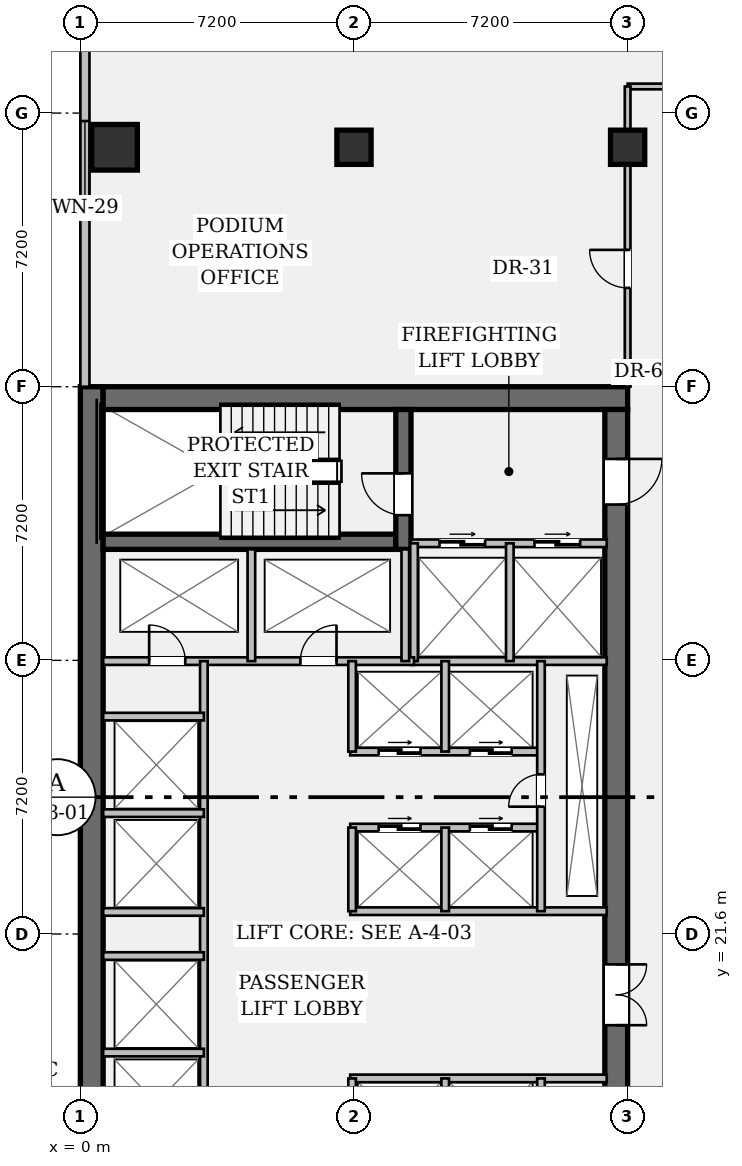
"""IFC4 building model, lengths in metres.
Left out: names, types, materials, properties, quantities, classifications, styles, units other than length and angle.
Written with IfcOpenShell. Run it as: python <this file> out.ifc"""

import sys

from ifc_helpers import new_model, si_unit, direction, frame, frame_2d, origin, origin_2d, place, context, subcontext, project, spatial, rectangle, hollow_rectangle, extrude, element, fill, save


model = new_model("IFC4")
c1 = context("Model", 3, precision=1e-05, world=origin(), true_north=direction((0.0, 1.0)))
c2 = subcontext(c1, "Body", "Model", "MODEL_VIEW")
j1 = project(units=[si_unit("LENGTHUNIT", "METRE"), si_unit("PLANEANGLEUNIT", "RADIAN")], contexts=[c1])
p1 = place(None, origin())
s1 = spatial("IfcSite", under=j1, at=p1, CompositionType="ELEMENT")
p2 = place(p1, origin())
s2 = spatial("IfcBuilding", under=s1, at=p2, CompositionType="ELEMENT")
p3 = place(p2, frame((0.0, 0.0, 5.25)))
s3 = spatial("IfcBuildingStorey", under=s2, at=p3, CompositionType="ELEMENT", Elevation=5.25)
p4 = place(p3, frame((0.3, 7.2, 0.0), z_axis=(0.0, 0.0, 1.0), x_axis=(0.0, 1.0, 0.0)))
e1 = element("IfcWall", 1, at=p4, inside=s3, PredefinedType="SHEAR", context=c2, shape_type="SweptSolid", body=[
    extrude(rectangle(XDim=28.8, YDim=0.6, at=frame_2d((14.4, 0.0))), origin(), (0.0, 0.0, 1.0), 3.9),
])
p5 = place(p3, frame((0.6, 35.7, 0.0), z_axis=(0.0, 0.0, 1.0), x_axis=(1.0, 0.0, 0.0)))
e2 = element("IfcWall", 2, at=p5, inside=s3, PredefinedType="SHEAR", context=c2, shape_type="SweptSolid", body=[
    extrude(rectangle(XDim=13.8, YDim=0.6, at=frame_2d((6.9, 0.0))), origin(), (0.0, 0.0, 1.0), 3.9),
])
p6 = place(p3, frame((14.1, 35.4, 0.0), z_axis=(0.0, 0.0, 1.0), x_axis=(0.0, -1.0, 0.0)))
e3 = element("IfcWall", 3, at=p6, inside=s3, PredefinedType="SHEAR", context=c2, shape_type="SweptSolid", body=[
    extrude(rectangle(XDim=27.6, YDim=0.6, at=frame_2d((13.8, 0.0))), origin(), (0.0, 0.0, 1.0), 3.9),
])
p7 = place(p6, frame((1.3, 0.0, 0.0)))
e4 = element("IfcOpeningElement", 4, at=p7, cuts=e3, PredefinedType="OPENING", context=c2, shape_type="SweptSolid", body=[
    extrude(rectangle(XDim=1.2, YDim=2.15, at=frame_2d((0.6, 1.075))), frame((0.0, 0.312, 0.0), z_axis=(0.0, -1.0, 0.0), x_axis=(1.0, 0.0, 0.0)), (0.0, 0.0, 1.0), 0.624),
])
p8 = place(p6, frame((25.25, 0.0, 0.0)))
e5 = element("IfcOpeningElement", 5, at=p8, cuts=e3, PredefinedType="OPENING", context=c2, shape_type="SweptSolid", body=[
    extrude(rectangle(XDim=1.2, YDim=2.15, at=frame_2d((0.6, 1.075))), frame((0.0, 0.312, 0.0), z_axis=(0.0, -1.0, 0.0), x_axis=(1.0, 0.0, 0.0)), (0.0, 0.0, 1.0), 0.624),
])
p9 = place(p6, frame((14.6, 0.0, 0.0)))
e6 = element("IfcOpeningElement", 6, at=p9, cuts=e3, PredefinedType="OPENING", context=c2, shape_type="SweptSolid", body=[
    extrude(rectangle(XDim=1.6, YDim=2.2, at=frame_2d((0.8, 1.1))), frame((0.0, 0.312, 0.0), z_axis=(0.0, -1.0, 0.0), x_axis=(1.0, 0.0, 0.0)), (0.0, 0.0, 1.0), 0.624),
])
p10 = place(p3, frame((0.6, 31.92, 0.0), z_axis=(0.0, 0.0, 1.0), x_axis=(1.0, 0.0, 0.0)))
e7 = element("IfcWall", 7, at=p10, inside=s3, PredefinedType="SHEAR", context=c2, shape_type="SweptSolid", body=[
    extrude(rectangle(XDim=7.7, YDim=0.4, at=frame_2d((3.85, 0.0))), origin(), (0.0, 0.0, 1.0), 3.9),
])
p11 = place(p3, frame((8.5, 31.72, 0.0), z_axis=(0.0, 0.0, 1.0), x_axis=(0.0, 1.0, 0.0)))
e8 = element("IfcWall", 8, at=p11, inside=s3, PredefinedType="SHEAR", context=c2, shape_type="SweptSolid", body=[
    extrude(rectangle(XDim=3.68, YDim=0.4, at=frame_2d((1.84, 0.0))), origin(), (0.0, 0.0, 1.0), 3.9),
])
p12 = place(p11, frame((0.9, 0.0, 0.0)))
e9 = element("IfcOpeningElement", 9, at=p12, cuts=e8, PredefinedType="OPENING", context=c2, shape_type="SweptSolid", body=[
    extrude(rectangle(XDim=1.1, YDim=2.15, at=frame_2d((0.55, 1.075))), frame((0.0, 0.212, 0.0), z_axis=(0.0, -1.0, 0.0), x_axis=(1.0, 0.0, 0.0)), (0.0, 0.0, 1.0), 0.424),
])
p13 = place(p3, frame((0.9, 42.3, 0.0), z_axis=(0.0, 0.0, 1.0), x_axis=(1.0, 0.0, 0.0)))
e10 = element("IfcColumn", 10, at=p13, inside=s3, PredefinedType="COLUMN", context=c2, shape_type="SweptSolid", body=[
    extrude(hollow_rectangle(XDim=1.2, YDim=1.2, WallThickness=0.075, at=origin_2d()), origin(), (0.0, 0.0, 1.0), 3.9),
])
for number, where, z_axis, x_axis in (
    (11, (7.2, 42.3, 0.0), (0.0, 0.0, 1.0), (1.0, 0.0, 0.0)),
    (12, (14.4, 42.3, 0.0), (0.0, 0.0, 1.0), (1.0, 0.0, 0.0)),
):
    element("IfcColumn", number, at=place(p3, frame(where, z_axis=z_axis, x_axis=x_axis)), inside=s3, PredefinedType="COLUMN", context=c2, shape_type="SweptSolid", body=[
        extrude(rectangle(XDim=0.9, YDim=0.9, at=origin_2d()), origin(), (0.0, 0.0, 1.0), 3.9),
    ])
p14 = place(p3, frame((0.12, 36.0, 0.0), z_axis=(0.0, 0.0, 1.0), x_axis=(0.0, 1.0, 0.0)))
e13 = element("IfcWall", 13, at=p14, inside=s3, PredefinedType="STANDARD", context=c2, shape_type="SweptSolid", body=[
    extrude(rectangle(XDim=11.58, YDim=0.24, at=frame_2d((5.79, 0.0))), origin(), (0.0, 0.0, 1.0), 3.9),
])
p15 = place(p14, frame((4.59, 0.0, 0.95)))
e14 = element("IfcOpeningElement", 14, at=p15, cuts=e13, PredefinedType="OPENING", context=c2, shape_type="SweptSolid", body=[
    extrude(rectangle(XDim=2.4, YDim=1.8, at=frame_2d((1.2, 0.9))), frame((0.0, 0.132, 0.0), z_axis=(0.0, -1.0, 0.0), x_axis=(1.0, 0.0, 0.0)), (0.0, 0.0, 1.0), 0.264),
])
p16 = place(p3, frame((8.7, 31.88, 0.0), z_axis=(0.0, 0.0, 1.0), x_axis=(1.0, 0.0, 0.0)))
e15 = element("IfcWall", 15, at=p16, inside=s3, PredefinedType="PARTITIONING", context=c2, shape_type="SweptSolid", body=[
    extrude(rectangle(XDim=5.15, YDim=0.2, at=frame_2d((2.575, 0.0))), origin(), (0.0, 0.0, 1.0), 3.9),
])
p17 = place(p16, frame((0.75, 0.0, 0.0)))
e16 = element("IfcOpeningElement", 16, at=p17, cuts=e15, PredefinedType="OPENING", context=c2, shape_type="SweptSolid", body=[
    extrude(rectangle(XDim=1.2, YDim=2.2, at=frame_2d((0.6, 1.1))), frame((0.0, 0.112, 0.0), z_axis=(0.0, -1.0, 0.0), x_axis=(1.0, 0.0, 0.0)), (0.0, 0.0, 1.0), 0.224),
])
p18 = place(p16, frame((3.25, 0.0, 0.0)))
e17 = element("IfcOpeningElement", 17, at=p18, cuts=e15, PredefinedType="OPENING", context=c2, shape_type="SweptSolid", body=[
    extrude(rectangle(XDim=1.2, YDim=2.2, at=frame_2d((0.6, 1.1))), frame((0.0, 0.112, 0.0), z_axis=(0.0, -1.0, 0.0), x_axis=(1.0, 0.0, 0.0)), (0.0, 0.0, 1.0), 0.224),
])
p19 = place(p3, frame((8.7, 28.78, 0.0), z_axis=(0.0, 0.0, 1.0), x_axis=(1.0, 0.0, 0.0)))
e18 = element("IfcWall", 18, at=p19, inside=s3, PredefinedType="PARTITIONING", context=c2, shape_type="SweptSolid", body=[
    extrude(rectangle(XDim=5.15, YDim=0.2, at=frame_2d((2.575, 0.0))), origin(), (0.0, 0.0, 1.0), 3.9),
])
for number, where, z_axis, x_axis in (
    (19, (8.78, 28.78, 0.0), (0.0, 0.0, 1.0), (0.0, 1.0, 0.0)),
    (20, (11.3, 28.78, 0.0), (0.0, 0.0, 1.0), (0.0, 1.0, 0.0)),
):
    element("IfcWall", number, at=place(p3, frame(where, z_axis=z_axis, x_axis=x_axis)), inside=s3, PredefinedType="PARTITIONING", context=c2, shape_type="SweptSolid", body=[
        extrude(rectangle(XDim=3.1, YDim=0.2, at=frame_2d((1.55, 0.0))), origin(), (0.0, 0.0, 1.0), 3.9),
    ])
p20 = place(p3, frame((0.6, 28.78, 0.0), z_axis=(0.0, 0.0, 1.0), x_axis=(1.0, 0.0, 0.0)))
e21 = element("IfcWall", 21, at=p20, inside=s3, PredefinedType="PARTITIONING", context=c2, shape_type="SweptSolid", body=[
    extrude(rectangle(XDim=8.18, YDim=0.2, at=frame_2d((4.09, 0.0))), origin(), (0.0, 0.0, 1.0), 3.9),
])
p21 = place(p20, frame((1.21, 0.0, 0.0)))
e22 = element("IfcOpeningElement", 22, at=p21, cuts=e21, PredefinedType="OPENING", context=c2, shape_type="SweptSolid", body=[
    extrude(rectangle(XDim=0.95, YDim=2.15, at=frame_2d((0.475, 1.075))), frame((0.0, 0.112, 0.0), z_axis=(0.0, -1.0, 0.0), x_axis=(1.0, 0.0, 0.0)), (0.0, 0.0, 1.0), 0.224),
])
p22 = place(p20, frame((5.19, 0.0, 0.0)))
e23 = element("IfcOpeningElement", 23, at=p22, cuts=e21, PredefinedType="OPENING", context=c2, shape_type="SweptSolid", body=[
    extrude(rectangle(XDim=0.95, YDim=2.15, at=frame_2d((0.475, 1.075))), frame((0.0, 0.112, 0.0), z_axis=(0.0, -1.0, 0.0), x_axis=(1.0, 0.0, 0.0)), (0.0, 0.0, 1.0), 0.224),
])
for number, where, z_axis, x_axis in (
    (24, (4.5, 28.78, 0.0), (0.0, 0.0, 1.0), (0.0, 1.0, 0.0)),
    (25, (8.55, 28.78, 0.0), (0.0, 0.0, 1.0), (0.0, 1.0, 0.0)),
):
    element("IfcWall", number, at=place(p3, frame(where, z_axis=z_axis, x_axis=x_axis)), inside=s3, PredefinedType="PARTITIONING", context=c2, shape_type="SweptSolid", body=[
        extrude(rectangle(XDim=2.94, YDim=0.2, at=frame_2d((1.47, 0.0))), origin(), (0.0, 0.0, 1.0), 3.9),
    ])
p23 = place(p3, frame((3.25, 15.7, 0.0), z_axis=(0.0, 0.0, 1.0), x_axis=(0.0, 1.0, 0.0)))
e26 = element("IfcWall", 26, at=p23, inside=s3, PredefinedType="PARTITIONING", context=c2, shape_type="SweptSolid", body=[
    extrude(rectangle(XDim=13.08, YDim=0.2, at=frame_2d((6.54, 0.0))), origin(), (0.0, 0.0, 1.0), 3.9),
])
for number, where, z_axis, x_axis in (
    (27, (0.6, 18.48, 0.0), (0.0, 0.0, 1.0), (1.0, 0.0, 0.0)),
    (28, (0.6, 22.18, 0.0), (0.0, 0.0, 1.0), (1.0, 0.0, 0.0)),
    (29, (0.6, 24.78, 0.0), (0.0, 0.0, 1.0), (1.0, 0.0, 0.0)),
    (30, (0.6, 21.02, 0.0), (0.0, 0.0, 1.0), (1.0, 0.0, 0.0)),
    (31, (0.6, 27.32, 0.0), (0.0, 0.0, 1.0), (1.0, 0.0, 0.0)),
):
    element("IfcWall", number, at=place(p3, frame(where, z_axis=z_axis, x_axis=x_axis)), inside=s3, PredefinedType="PARTITIONING", context=c2, shape_type="SweptSolid", body=[
        extrude(rectangle(XDim=2.65, YDim=0.2, at=frame_2d((1.325, 0.0))), origin(), (0.0, 0.0, 1.0), 3.9),
    ])
p24 = place(p3, frame((7.1, 22.2, 0.0), z_axis=(0.0, 0.0, 1.0), x_axis=(1.0, 0.0, 0.0)))
e32 = element("IfcWall", 32, at=p24, inside=s3, PredefinedType="PARTITIONING", context=c2, shape_type="SweptSolid", body=[
    extrude(rectangle(XDim=6.75, YDim=0.2, at=frame_2d((3.375, 0.0))), origin(), (0.0, 0.0, 1.0), 3.9),
])
p25 = place(p3, frame((7.1, 24.4, 0.0), z_axis=(0.0, 0.0, 1.0), x_axis=(1.0, 0.0, 0.0)))
e33 = element("IfcWall", 33, at=p25, inside=s3, PredefinedType="PARTITIONING", context=c2, shape_type="SweptSolid", body=[
    extrude(rectangle(XDim=5.02, YDim=0.2, at=frame_2d((2.51, 0.0))), origin(), (0.0, 0.0, 1.0), 3.9),
])
p26 = place(p25, frame((0.75, 0.0, 0.0)))
e34 = element("IfcOpeningElement", 34, at=p26, cuts=e33, PredefinedType="OPENING", context=c2, shape_type="SweptSolid", body=[
    extrude(rectangle(XDim=1.1, YDim=2.2, at=frame_2d((0.55, 1.1))), frame((0.0, 0.112, 0.0), z_axis=(0.0, -1.0, 0.0), x_axis=(1.0, 0.0, 0.0)), (0.0, 0.0, 1.0), 0.224),
])
p27 = place(p25, frame((3.15, 0.0, 0.0)))
e35 = element("IfcOpeningElement", 35, at=p27, cuts=e33, PredefinedType="OPENING", context=c2, shape_type="SweptSolid", body=[
    extrude(rectangle(XDim=1.1, YDim=2.2, at=frame_2d((0.55, 1.1))), frame((0.0, 0.112, 0.0), z_axis=(0.0, -1.0, 0.0), x_axis=(1.0, 0.0, 0.0)), (0.0, 0.0, 1.0), 0.224),
])
p28 = place(p3, frame((7.1, 26.4, 0.0), z_axis=(0.0, 0.0, 1.0), x_axis=(1.0, 0.0, 0.0)))
e36 = element("IfcWall", 36, at=p28, inside=s3, PredefinedType="PARTITIONING", context=c2, shape_type="SweptSolid", body=[
    extrude(rectangle(XDim=5.02, YDim=0.2, at=frame_2d((2.51, 0.0))), origin(), (0.0, 0.0, 1.0), 3.9),
])
p29 = place(p28, frame((0.75, 0.0, 0.0)))
e37 = element("IfcOpeningElement", 37, at=p29, cuts=e36, PredefinedType="OPENING", context=c2, shape_type="SweptSolid", body=[
    extrude(rectangle(XDim=1.1, YDim=2.2, at=frame_2d((0.55, 1.1))), frame((0.0, 0.112, 0.0), z_axis=(0.0, -1.0, 0.0), x_axis=(1.0, 0.0, 0.0)), (0.0, 0.0, 1.0), 0.224),
])
p30 = place(p28, frame((3.15, 0.0, 0.0)))
e38 = element("IfcOpeningElement", 38, at=p30, cuts=e36, PredefinedType="OPENING", context=c2, shape_type="SweptSolid", body=[
    extrude(rectangle(XDim=1.1, YDim=2.2, at=frame_2d((0.55, 1.1))), frame((0.0, 0.112, 0.0), z_axis=(0.0, -1.0, 0.0), x_axis=(1.0, 0.0, 0.0)), (0.0, 0.0, 1.0), 0.224),
])
p31 = place(p3, frame((7.15, 22.2, 0.0), z_axis=(0.0, 0.0, 1.0), x_axis=(0.0, 1.0, 0.0)))
e39 = element("IfcWall", 39, at=p31, inside=s3, PredefinedType="PARTITIONING", context=c2, shape_type="SweptSolid", body=[
    extrude(rectangle(XDim=2.2, YDim=0.2, at=frame_2d((1.1, 0.0))), origin(), (0.0, 0.0, 1.0), 3.9),
])
p32 = place(p3, frame((7.15, 26.4, 0.0), z_axis=(0.0, 0.0, 1.0), x_axis=(0.0, 1.0, 0.0)))
e40 = element("IfcWall", 40, at=p32, inside=s3, PredefinedType="PARTITIONING", context=c2, shape_type="SweptSolid", body=[
    extrude(rectangle(XDim=2.38, YDim=0.2, at=frame_2d((1.19, 0.0))), origin(), (0.0, 0.0, 1.0), 3.9),
])
p33 = place(p3, frame((9.6, 22.2, 0.0), z_axis=(0.0, 0.0, 1.0), x_axis=(0.0, 1.0, 0.0)))
e41 = element("IfcWall", 41, at=p33, inside=s3, PredefinedType="PARTITIONING", context=c2, shape_type="SweptSolid", body=[
    extrude(rectangle(XDim=2.2, YDim=0.2, at=frame_2d((1.1, 0.0))), origin(), (0.0, 0.0, 1.0), 3.9),
])
p34 = place(p3, frame((9.6, 26.4, 0.0), z_axis=(0.0, 0.0, 1.0), x_axis=(0.0, 1.0, 0.0)))
e42 = element("IfcWall", 42, at=p34, inside=s3, PredefinedType="PARTITIONING", context=c2, shape_type="SweptSolid", body=[
    extrude(rectangle(XDim=2.38, YDim=0.2, at=frame_2d((1.19, 0.0))), origin(), (0.0, 0.0, 1.0), 3.9),
])
p35 = place(p3, frame((12.12, 22.2, 0.0), z_axis=(0.0, 0.0, 1.0), x_axis=(0.0, 1.0, 0.0)))
e43 = element("IfcWall", 43, at=p35, inside=s3, PredefinedType="PARTITIONING", context=c2, shape_type="SweptSolid", body=[
    extrude(rectangle(XDim=6.58, YDim=0.2, at=frame_2d((3.29, 0.0))), origin(), (0.0, 0.0, 1.0), 3.9),
])
p36 = place(p35, frame((2.75, 0.0, 0.0)))
e44 = element("IfcOpeningElement", 44, at=p36, cuts=e43, PredefinedType="OPENING", context=c2, shape_type="SweptSolid", body=[
    extrude(rectangle(XDim=0.85, YDim=2.15, at=frame_2d((0.425, 1.075))), frame((0.0, 0.112, 0.0), z_axis=(0.0, -1.0, 0.0), x_axis=(1.0, 0.0, 0.0)), (0.0, 0.0, 1.0), 0.224),
])
p37 = place(p3, frame((7.1, 17.8, 0.0), z_axis=(0.0, 0.0, 1.0), x_axis=(1.0, 0.0, 0.0)))
e45 = element("IfcWall", 45, at=p37, inside=s3, PredefinedType="PARTITIONING", context=c2, shape_type="SweptSolid", body=[
    extrude(rectangle(XDim=6.75, YDim=0.2, at=frame_2d((3.375, 0.0))), origin(), (0.0, 0.0, 1.0), 3.9),
])
for number, where, z_axis, x_axis in (
    (46, (7.15, 15.6, 0.0), (0.0, 0.0, 1.0), (0.0, 1.0, 0.0)),
    (47, (9.6, 15.6, 0.0), (0.0, 0.0, 1.0), (0.0, 1.0, 0.0)),
):
    element("IfcWall", number, at=place(p3, frame(where, z_axis=z_axis, x_axis=x_axis)), inside=s3, PredefinedType="PARTITIONING", context=c2, shape_type="SweptSolid", body=[
        extrude(rectangle(XDim=2.2, YDim=0.2, at=frame_2d((1.1, 0.0))), origin(), (0.0, 0.0, 1.0), 3.9),
    ])
p38 = place(p3, frame((12.12, 11.2, 0.0), z_axis=(0.0, 0.0, 1.0), x_axis=(0.0, 1.0, 0.0)))
e48 = element("IfcWall", 48, at=p38, inside=s3, PredefinedType="PARTITIONING", context=c2, shape_type="SweptSolid", body=[
    extrude(rectangle(XDim=6.6, YDim=0.2, at=frame_2d((3.3, 0.0))), origin(), (0.0, 0.0, 1.0), 3.9),
])
p39 = place(p38, frame((2.95, 0.0, 0.0)))
e49 = element("IfcOpeningElement", 49, at=p39, cuts=e48, PredefinedType="OPENING", context=c2, shape_type="SweptSolid", body=[
    extrude(rectangle(XDim=0.85, YDim=2.15, at=frame_2d((0.425, 1.075))), frame((0.0, 0.112, 0.0), z_axis=(0.0, -1.0, 0.0), x_axis=(1.0, 0.0, 0.0)), (0.0, 0.0, 1.0), 0.224),
])
p40 = place(p3, frame((14.4, 43.9, 0.0), z_axis=(0.0, 0.0, 1.0), x_axis=(1.0, 0.0, 0.0)))
e50 = element("IfcWall", 50, at=p40, inside=s3, PredefinedType="PARTITIONING", context=c2, shape_type="SweptSolid", body=[
    extrude(rectangle(XDim=7.7, YDim=0.15, at=frame_2d((3.85, 0.0))), origin(), (0.0, 0.0, 1.0), 2.938),
])
p41 = place(p40, frame((3.6, 0.0, 0.0)))
e51 = element("IfcOpeningElement", 51, at=p41, cuts=e50, PredefinedType="OPENING", context=c2, shape_type="SweptSolid", body=[
    extrude(rectangle(XDim=1.0, YDim=2.15, at=frame_2d((0.5, 1.075))), frame((0.0, 0.087, 0.0), z_axis=(0.0, -1.0, 0.0), x_axis=(1.0, 0.0, 0.0)), (0.0, 0.0, 1.0), 0.174),
])
p42 = place(p3, frame((14.4, 36.0, 0.0), z_axis=(0.0, 0.0, 1.0), x_axis=(0.0, 1.0, 0.0)))
e52 = element("IfcWall", 52, at=p42, inside=s3, PredefinedType="PARTITIONING", context=c2, shape_type="SweptSolid", body=[
    extrude(rectangle(XDim=7.9, YDim=0.15, at=frame_2d((3.95, 0.0))), origin(), (0.0, 0.0, 1.0), 2.938),
])
p43 = place(p42, frame((2.6, 0.0, 0.0)))
e53 = element("IfcOpeningElement", 53, at=p43, cuts=e52, PredefinedType="OPENING", context=c2, shape_type="SweptSolid", body=[
    extrude(rectangle(XDim=1.0, YDim=2.15, at=frame_2d((0.5, 1.075))), frame((0.0, 0.087, 0.0), z_axis=(0.0, -1.0, 0.0), x_axis=(1.0, 0.0, 0.0)), (0.0, 0.0, 1.0), 0.174),
])
p44 = place(p15, origin())
e54 = element("IfcWindow", 54, at=p44, inside=s3, PartitioningType="SINGLE_PANEL", PredefinedType="WINDOW", context=c2, shape_type="SweptSolid", body=[
    extrude(rectangle(XDim=2.4, YDim=1.8, at=frame_2d((1.2, 0.9))), frame((0.0, 0.03, 0.0), z_axis=(0.0, -1.0, 0.0), x_axis=(1.0, 0.0, 0.0)), (0.0, 0.0, 1.0), 0.06),
])
fill(e14, e54)
p45 = place(p12, origin())
e55 = element("IfcDoor", 55, at=p45, inside=s3, OperationType="SINGLE_SWING_RIGHT", PredefinedType="DOOR", context=c2, shape_type="SweptSolid", body=[
    extrude(rectangle(XDim=1.1, YDim=2.15, at=frame_2d((0.55, 1.075))), frame((0.0, 0.025, 0.0), z_axis=(0.0, -1.0, 0.0), x_axis=(1.0, 0.0, 0.0)), (0.0, 0.0, 1.0), 0.05),
])
fill(e9, e55)
p46 = place(p7, origin())
e56 = element("IfcDoor", 56, at=p46, inside=s3, OperationType="SINGLE_SWING_LEFT", PredefinedType="DOOR", context=c2, shape_type="SweptSolid", body=[
    extrude(rectangle(XDim=1.2, YDim=2.15, at=frame_2d((0.6, 1.075))), frame((0.0, 0.025, 0.0), z_axis=(0.0, -1.0, 0.0), x_axis=(1.0, 0.0, 0.0)), (0.0, 0.0, 1.0), 0.05),
])
fill(e4, e56)
p47 = place(p17, origin())
e57 = element("IfcDoor", 57, at=p47, inside=s3, OperationType="DOUBLE_DOOR_SLIDING", PredefinedType="DOOR", context=c2, shape_type="SweptSolid", body=[
    extrude(rectangle(XDim=1.2, YDim=2.2, at=frame_2d((0.6, 1.1))), frame((0.0, 0.025, 0.0), z_axis=(0.0, -1.0, 0.0), x_axis=(1.0, 0.0, 0.0)), (0.0, 0.0, 1.0), 0.05),
])
fill(e16, e57)
p48 = place(p18, origin())
e58 = element("IfcDoor", 58, at=p48, inside=s3, OperationType="DOUBLE_DOOR_SLIDING", PredefinedType="DOOR", context=c2, shape_type="SweptSolid", body=[
    extrude(rectangle(XDim=1.2, YDim=2.2, at=frame_2d((0.6, 1.1))), frame((0.0, 0.025, 0.0), z_axis=(0.0, -1.0, 0.0), x_axis=(1.0, 0.0, 0.0)), (0.0, 0.0, 1.0), 0.05),
])
fill(e17, e58)
p49 = place(p21, origin())
e59 = element("IfcDoor", 59, at=p49, inside=s3, OperationType="SINGLE_SWING_LEFT", PredefinedType="DOOR", context=c2, shape_type="SweptSolid", body=[
    extrude(rectangle(XDim=0.95, YDim=2.15, at=frame_2d((0.475, 1.075))), frame((0.0, 0.025, 0.0), z_axis=(0.0, -1.0, 0.0), x_axis=(1.0, 0.0, 0.0)), (0.0, 0.0, 1.0), 0.05),
])
fill(e22, e59)
p50 = place(p22, origin())
e60 = element("IfcDoor", 60, at=p50, inside=s3, OperationType="SINGLE_SWING_RIGHT", PredefinedType="DOOR", context=c2, shape_type="SweptSolid", body=[
    extrude(rectangle(XDim=0.95, YDim=2.15, at=frame_2d((0.475, 1.075))), frame((0.0, 0.025, 0.0), z_axis=(0.0, -1.0, 0.0), x_axis=(1.0, 0.0, 0.0)), (0.0, 0.0, 1.0), 0.05),
])
fill(e23, e60)
p51 = place(p9, origin())
e61 = element("IfcDoor", 61, at=p51, inside=s3, OperationType="DOUBLE_DOOR_SINGLE_SWING", PredefinedType="DOOR", context=c2, shape_type="SweptSolid", body=[
    extrude(rectangle(XDim=1.6, YDim=2.2, at=frame_2d((0.8, 1.1))), frame((0.0, 0.025, 0.0), z_axis=(0.0, -1.0, 0.0), x_axis=(1.0, 0.0, 0.0)), (0.0, 0.0, 1.0), 0.05),
])
fill(e6, e61)
p52 = place(p36, origin())
e62 = element("IfcDoor", 62, at=p52, inside=s3, OperationType="SINGLE_SWING_LEFT", PredefinedType="DOOR", context=c2, shape_type="SweptSolid", body=[
    extrude(rectangle(XDim=0.85, YDim=2.15, at=frame_2d((0.425, 1.075))), frame((0.0, 0.025, 0.0), z_axis=(0.0, -1.0, 0.0), x_axis=(1.0, 0.0, 0.0)), (0.0, 0.0, 1.0), 0.05),
])
fill(e44, e62)
p53 = place(p26, origin())
e63 = element("IfcDoor", 63, at=p53, inside=s3, OperationType="DOUBLE_DOOR_SLIDING", PredefinedType="DOOR", context=c2, shape_type="SweptSolid", body=[
    extrude(rectangle(XDim=1.1, YDim=2.2, at=frame_2d((0.55, 1.1))), frame((0.0, 0.025, 0.0), z_axis=(0.0, -1.0, 0.0), x_axis=(1.0, 0.0, 0.0)), (0.0, 0.0, 1.0), 0.05),
])
fill(e34, e63)
p54 = place(p27, origin())
e64 = element("IfcDoor", 64, at=p54, inside=s3, OperationType="DOUBLE_DOOR_SLIDING", PredefinedType="DOOR", context=c2, shape_type="SweptSolid", body=[
    extrude(rectangle(XDim=1.1, YDim=2.2, at=frame_2d((0.55, 1.1))), frame((0.0, 0.025, 0.0), z_axis=(0.0, -1.0, 0.0), x_axis=(1.0, 0.0, 0.0)), (0.0, 0.0, 1.0), 0.05),
])
fill(e35, e64)
p55 = place(p29, origin())
e65 = element("IfcDoor", 65, at=p55, inside=s3, OperationType="DOUBLE_DOOR_SLIDING", PredefinedType="DOOR", context=c2, shape_type="SweptSolid", body=[
    extrude(rectangle(XDim=1.1, YDim=2.2, at=frame_2d((0.55, 1.1))), frame((0.0, 0.025, 0.0), z_axis=(0.0, -1.0, 0.0), x_axis=(1.0, 0.0, 0.0)), (0.0, 0.0, 1.0), 0.05),
])
fill(e37, e65)
p56 = place(p30, origin())
e66 = element("IfcDoor", 66, at=p56, inside=s3, OperationType="DOUBLE_DOOR_SLIDING", PredefinedType="DOOR", context=c2, shape_type="SweptSolid", body=[
    extrude(rectangle(XDim=1.1, YDim=2.2, at=frame_2d((0.55, 1.1))), frame((0.0, 0.025, 0.0), z_axis=(0.0, -1.0, 0.0), x_axis=(1.0, 0.0, 0.0)), (0.0, 0.0, 1.0), 0.05),
])
fill(e38, e66)
p57 = place(p43, origin())
e67 = element("IfcDoor", 67, at=p57, inside=s3, OperationType="SINGLE_SWING_RIGHT", PredefinedType="DOOR", context=c2, shape_type="SweptSolid", body=[
    extrude(rectangle(XDim=1.0, YDim=2.15, at=frame_2d((0.5, 1.075))), frame((0.0, 0.025, 0.0), z_axis=(0.0, -1.0, 0.0), x_axis=(1.0, 0.0, 0.0)), (0.0, 0.0, 1.0), 0.05),
])
fill(e53, e67)
save(model, sys.argv[1])
